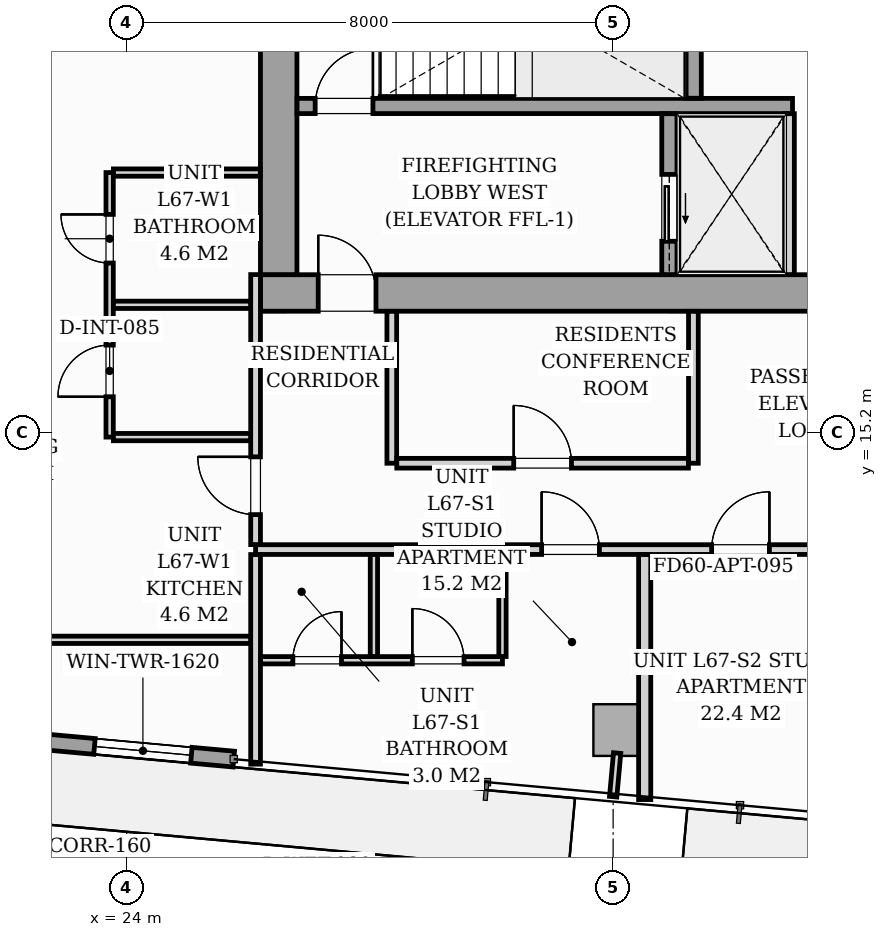
"""IFC4 building model, lengths in metres.
Left out: names, types, materials, properties, quantities, classifications, styles, units other than length and angle.
Written with IfcOpenShell. Run it as: python <this file> out.ifc"""

import sys

from ifc_helpers import new_model, si_unit, direction, frame, frame_2d, origin, origin_2d, place, context, subcontext, project, spatial, rectangle, i_section, extrude, source, transform, mapped, element, fill, save


model = new_model("IFC4")
c1 = context("Model", 3, precision=1e-05, world=origin(), true_north=direction((0.0, 1.0)))
c2 = subcontext(c1, "Body", "Model", "MODEL_VIEW")
j1 = project(units=[si_unit("LENGTHUNIT", "METRE"), si_unit("PLANEANGLEUNIT", "RADIAN")], contexts=[c1])
p1 = place(None, origin())
s1 = spatial("IfcSite", under=j1, at=p1, CompositionType="ELEMENT")
p2 = place(p1, origin())
s2 = spatial("IfcBuilding", under=s1, at=p2, CompositionType="ELEMENT")
p3 = place(p2, frame((0.0, 0.0, 233.1)))
s3 = spatial("IfcBuildingStorey", under=s2, at=p3, CompositionType="ELEMENT", Elevation=233.1)
m1 = source(origin(), c2, "Body", "SweptSolid", [
    extrude(i_section(OverallWidth=0.409, OverallDepth=0.425, WebThickness=0.033, FlangeThickness=0.052, FilletRadius=0.018, at=origin_2d()), origin(), (0.0, 0.0, 1.0), 3.296),
])
for number, where, z_axis, x_axis in (
    (1, (26.4, 17.4, 0.002), (0.0, 0.0, 1.0), (1.0, 0.0, 0.0)),
    (2, (33.12, 17.4, 0.002), (0.0, 0.0, 1.0), (1.0, 0.0, 0.0)),
):
    element("IfcColumn", number, at=place(p3, frame(where, z_axis=z_axis, x_axis=x_axis)), inside=s3, PredefinedType="PILASTER", context=c2, shape_type="MappedRepresentation", body=[
        mapped(m1, transform((0.0, 0.0, 0.0), scale=1.0)),
    ])
m2 = source(origin(), c2, "Body", "SweptSolid", [
    extrude(rectangle(XDim=0.85, YDim=0.85, at=origin_2d()), origin(), (0.0, 0.0, 1.0), 3.296),
])
p4 = place(p3, frame((32.1, 10.312, 0.002), z_axis=(0.0, 0.0, 1.0), x_axis=(0.995884398616, -0.090632580198, 0.0)))
e3 = element("IfcColumn", 3, at=p4, inside=s3, PredefinedType="COLUMN", context=c2, shape_type="MappedRepresentation", body=[
    mapped(m2, transform((0.0, 0.0, 0.0), scale=1.0)),
])
p5 = place(p3, frame((25.761, 9.834, 0.0), z_axis=(0.0, 0.0, 1.0), x_axis=(-0.995884584572, 0.090630536861, 0.0)))
e4 = element("IfcWall", 4, at=p5, inside=s3, PredefinedType="STANDARD", context=c2, shape_type="SweptSolid", body=[
    extrude(rectangle(XDim=14.63, YDim=0.26, at=frame_2d((7.315, 0.0))), origin(), (0.0, 0.0, 1.0), 3.04),
])
p6 = place(p5, frame((4.97, 0.0, 0.0)))
e5 = element("IfcOpeningElement", 5, at=p6, cuts=e4, PredefinedType="OPENING", context=c2, shape_type="SweptSolid", body=[
    extrude(rectangle(XDim=1.8, YDim=2.06, at=frame_2d((0.9, 1.03))), frame((0.0, 0.14, 0.0), z_axis=(0.0, -1.0, 0.0), x_axis=(1.0, 0.0, 0.0)), (0.0, 0.0, 1.0), 0.28),
])
p7 = place(p5, frame((0.7, 0.0, 0.65)))
e6 = element("IfcOpeningElement", 6, at=p7, cuts=e4, PredefinedType="OPENING", context=c2, shape_type="SweptSolid", body=[
    extrude(rectangle(XDim=1.6, YDim=1.5, at=frame_2d((0.8, 0.75))), frame((0.0, 0.14, 0.0), z_axis=(0.0, -1.0, 0.0), x_axis=(1.0, 0.0, 0.0)), (0.0, 0.0, 1.0), 0.28),
])
p8 = place(p3, frame((26.2, 17.5, 0.0), z_axis=(0.0, 0.0, 1.0), x_axis=(1.0, 0.0, 0.0)))
e7 = element("IfcWall", 7, at=p8, inside=s3, PredefinedType="SHEAR", context=c2, shape_type="SweptSolid", body=[
    extrude(rectangle(XDim=19.6, YDim=0.6, at=frame_2d((9.8, 0.0))), origin(), (0.0, 0.0, 1.0), 3.3),
])
p9 = place(p8, frame((0.95, 0.0, 0.0)))
e8 = element("IfcOpeningElement", 8, at=p9, cuts=e7, PredefinedType="OPENING", context=c2, shape_type="SweptSolid", body=[
    extrude(rectangle(XDim=0.95, YDim=2.06, at=frame_2d((0.475, 1.03))), frame((0.0, 0.31, 0.0), z_axis=(0.0, -1.0, 0.0), x_axis=(1.0, 0.0, 0.0)), (0.0, 0.0, 1.0), 0.62),
])
p10 = place(p8, frame((9.38, 0.0, 0.0)))
e9 = element("IfcOpeningElement", 9, at=p10, cuts=e7, PredefinedType="OPENING", context=c2, shape_type="SweptSolid", body=[
    extrude(rectangle(XDim=0.85, YDim=2.0, at=frame_2d((0.425, 1.0))), frame((0.0, 0.31, 0.0), z_axis=(0.0, -1.0, 0.0), x_axis=(1.0, 0.0, 0.0)), (0.0, 0.0, 1.0), 0.62),
])
p11 = place(p8, frame((17.55, 0.0, 0.0)))
e10 = element("IfcOpeningElement", 10, at=p11, cuts=e7, PredefinedType="OPENING", context=c2, shape_type="SweptSolid", body=[
    extrude(rectangle(XDim=0.95, YDim=2.06, at=frame_2d((0.475, 1.03))), frame((0.0, 0.31, 0.0), z_axis=(0.0, -1.0, 0.0), x_axis=(1.0, 0.0, 0.0)), (0.0, 0.0, 1.0), 0.62),
])
p12 = place(p3, frame((26.5, 17.802, 0.0), z_axis=(0.0, 0.0, 1.0), x_axis=(0.0, 1.0, 0.0)))
e11 = element("IfcWall", 11, at=p12, inside=s3, PredefinedType="SHEAR", context=c2, shape_type="SweptSolid", body=[
    extrude(rectangle(XDim=5.796, YDim=0.6, at=frame_2d((2.898, 0.0))), origin(), (0.0, 0.0, 1.0), 3.3),
])
p13 = place(p3, frame((26.802, 20.575, 0.0), z_axis=(0.0, 0.0, 1.0), x_axis=(1.0, 0.0, 0.0)))
e12 = element("IfcWall", 12, at=p13, inside=s3, PredefinedType="SOLIDWALL", context=c2, shape_type="SweptSolid", body=[
    extrude(rectangle(XDim=8.148, YDim=0.25, at=frame_2d((4.074, 0.0))), origin(), (0.0, 0.0, 1.0), 3.3),
])
p14 = place(p13, frame((0.298, 0.0, 0.0)))
e13 = element("IfcOpeningElement", 13, at=p14, cuts=e12, PredefinedType="OPENING", context=c2, shape_type="SweptSolid", body=[
    extrude(rectangle(XDim=0.95, YDim=2.06, at=frame_2d((0.475, 1.03))), frame((0.0, 0.135, 0.0), z_axis=(0.0, -1.0, 0.0), x_axis=(1.0, 0.0, 0.0)), (0.0, 0.0, 1.0), 0.27),
])
p15 = place(p3, frame((33.325, 20.702, 0.0), z_axis=(0.0, 0.0, 1.0), x_axis=(0.0, 1.0, 0.0)))
e14 = element("IfcWall", 14, at=p15, inside=s3, PredefinedType="SOLIDWALL", context=c2, shape_type="SweptSolid", body=[
    extrude(rectangle(XDim=2.896, YDim=0.25, at=frame_2d((1.448, 0.0))), origin(), (0.0, 0.0, 1.0), 3.3),
])
p16 = place(p3, frame((32.925, 17.802, 0.0), z_axis=(0.0, 0.0, 1.0), x_axis=(0.0, 1.0, 0.0)))
e15 = element("IfcWall", 15, at=p16, inside=s3, PredefinedType="SOLIDWALL", context=c2, shape_type="SweptSolid", body=[
    extrude(rectangle(XDim=2.646, YDim=0.25, at=frame_2d((1.323, 0.0))), origin(), (0.0, 0.0, 1.0), 3.3),
])
p17 = place(p16, frame((0.548, 0.0, 0.0)))
e16 = element("IfcOpeningElement", 16, at=p17, cuts=e15, PredefinedType="OPENING", context=c2, shape_type="SweptSolid", body=[
    extrude(rectangle(XDim=1.1, YDim=2.08, at=frame_2d((0.55, 1.04))), frame((0.0, 0.135, 0.0), z_axis=(0.0, -1.0, 0.0), x_axis=(1.0, 0.0, 0.0)), (0.0, 0.0, 1.0), 0.27),
])
p18 = place(p3, frame((34.9, 17.802, 0.0), z_axis=(0.0, 0.0, 1.0), x_axis=(0.0, 1.0, 0.0)))
e17 = element("IfcWall", 17, at=p18, inside=s3, PredefinedType="PARTITIONING", context=c2, shape_type="SweptSolid", body=[
    extrude(rectangle(XDim=2.646, YDim=0.16, at=frame_2d((1.323, 0.0))), origin(), (0.0, 0.0, 1.0), 3.04),
])
p19 = place(p3, frame((26.12, 13.28, 0.0), z_axis=(0.0, 0.0, 1.0), x_axis=(1.0, 0.0, 0.0)))
e18 = element("IfcWall", 18, at=p19, inside=s3, PredefinedType="PARTITIONING", context=c2, shape_type="SweptSolid", body=[
    extrude(rectangle(XDim=21.33, YDim=0.16, at=frame_2d((10.665, 0.0))), origin(), (0.0, 0.0, 1.0), 2.556),
])
p20 = place(p19, frame((4.704, 0.0, 0.0)))
e19 = element("IfcOpeningElement", 19, at=p20, cuts=e18, PredefinedType="OPENING", context=c2, shape_type="SweptSolid", body=[
    extrude(rectangle(XDim=0.95, YDim=2.06, at=frame_2d((0.475, 1.03))), frame((0.0, 0.09, 0.0), z_axis=(0.0, -1.0, 0.0), x_axis=(1.0, 0.0, 0.0)), (0.0, 0.0, 1.0), 0.18),
])
p21 = place(p19, frame((7.5, 0.0, 0.0)))
e20 = element("IfcOpeningElement", 20, at=p21, cuts=e18, PredefinedType="OPENING", context=c2, shape_type="SweptSolid", body=[
    extrude(rectangle(XDim=0.95, YDim=2.06, at=frame_2d((0.475, 1.03))), frame((0.0, 0.09, 0.0), z_axis=(0.0, -1.0, 0.0), x_axis=(1.0, 0.0, 0.0)), (0.0, 0.0, 1.0), 0.18),
])
p22 = place(p19, frame((14.976, 0.0, 0.0)))
e21 = element("IfcOpeningElement", 21, at=p22, cuts=e18, PredefinedType="OPENING", context=c2, shape_type="SweptSolid", body=[
    extrude(rectangle(XDim=0.95, YDim=2.06, at=frame_2d((0.475, 1.03))), frame((0.0, 0.09, 0.0), z_axis=(0.0, -1.0, 0.0), x_axis=(1.0, 0.0, 0.0)), (0.0, 0.0, 1.0), 0.18),
])
p23 = place(p3, frame((26.12, 9.751, 0.0), z_axis=(0.0, 0.0, 1.0), x_axis=(0.0, 1.0, 0.0)))
e22 = element("IfcWall", 22, at=p23, inside=s3, PredefinedType="PARTITIONING", context=c2, shape_type="SweptSolid", body=[
    extrude(rectangle(XDim=3.447, YDim=0.16, at=frame_2d((1.723, 0.0))), origin(), (0.0, 0.0, 1.0), 3.04),
])
p24 = place(p3, frame((26.12, 13.362, 0.0), z_axis=(0.0, 0.0, 1.0), x_axis=(0.0, 1.0, 0.0)))
e23 = element("IfcWall", 23, at=p24, inside=s3, PredefinedType="PARTITIONING", context=c2, shape_type="SweptSolid", body=[
    extrude(rectangle(XDim=4.44, YDim=0.16, at=frame_2d((2.22, 0.0))), origin(), (0.0, 0.0, 1.0), 3.04),
])
p25 = place(p24, frame((0.493, 0.0, 0.0)))
e24 = element("IfcOpeningElement", 24, at=p25, cuts=e23, PredefinedType="OPENING", context=c2, shape_type="SweptSolid", body=[
    extrude(rectangle(XDim=0.95, YDim=2.06, at=frame_2d((0.475, 1.03))), frame((0.0, 0.09, 0.0), z_axis=(0.0, -1.0, 0.0), x_axis=(1.0, 0.0, 0.0)), (0.0, 0.0, 1.0), 0.18),
])
p26 = place(p3, frame((26.202, 11.46, 0.0), z_axis=(0.0, 0.0, 1.0), x_axis=(1.0, 0.0, 0.0)))
e25 = element("IfcWall", 25, at=p26, inside=s3, PredefinedType="PARTITIONING", context=c2, shape_type="SweptSolid", body=[
    extrude(rectangle(XDim=3.978, YDim=0.12, at=frame_2d((1.989, 0.0))), origin(), (0.0, 0.0, 1.0), 2.556),
])
p27 = place(p26, frame((0.531, 0.0, 0.0)))
e26 = element("IfcOpeningElement", 26, at=p27, cuts=e25, PredefinedType="OPENING", context=c2, shape_type="SweptSolid", body=[
    extrude(rectangle(XDim=0.8, YDim=2.02, at=frame_2d((0.4, 1.01))), frame((0.0, 0.07, 0.0), z_axis=(0.0, -1.0, 0.0), x_axis=(1.0, 0.0, 0.0)), (0.0, 0.0, 1.0), 0.14),
])
p28 = place(p26, frame((2.496, 0.0, 0.0)))
e27 = element("IfcOpeningElement", 27, at=p28, cuts=e25, PredefinedType="OPENING", context=c2, shape_type="SweptSolid", body=[
    extrude(rectangle(XDim=0.85, YDim=2.05, at=frame_2d((0.425, 1.025))), frame((0.0, 0.07, 0.0), z_axis=(0.0, -1.0, 0.0), x_axis=(1.0, 0.0, 0.0)), (0.0, 0.0, 1.0), 0.14),
])
for number, where, z_axis, x_axis in (
    (28, (30.18, 11.522, 0.0), (0.0, 0.0, 1.0), (0.0, 1.0, 0.0)),
    (29, (28.066, 11.522, 0.0), (0.0, 0.0, 1.0), (0.0, 1.0, 0.0)),
):
    element("IfcWall", number, at=place(p3, frame(where, z_axis=z_axis, x_axis=x_axis)), inside=s3, PredefinedType="PARTITIONING", context=c2, shape_type="SweptSolid", body=[
        extrude(rectangle(XDim=1.676, YDim=0.12, at=frame_2d((0.838, 0.0))), origin(), (0.0, 0.0, 1.0), 3.04),
    ])
p29 = place(p3, frame((32.519, 9.169, 0.0), z_axis=(0.0, 0.0, 1.0), x_axis=(0.0, 1.0, 0.0)))
e30 = element("IfcWall", 30, at=p29, inside=s3, PredefinedType="PARTITIONING", context=c2, shape_type="SweptSolid", body=[
    extrude(rectangle(XDim=4.029, YDim=0.2, at=frame_2d((2.014, 0.0))), origin(), (0.0, 0.0, 1.0), 2.4),
])
p30 = place(p3, frame((23.72, 15.13, 0.0), z_axis=(0.0, 0.0, 1.0), x_axis=(0.0, 1.0, 0.0)))
e31 = element("IfcWall", 31, at=p30, inside=s3, PredefinedType="PARTITIONING", context=c2, shape_type="SweptSolid", body=[
    extrude(rectangle(XDim=4.35, YDim=0.12, at=frame_2d((2.175, 0.0))), origin(), (0.0, 0.0, 1.0), 3.04),
])
p31 = place(p30, frame((0.663, 0.0, 0.0)))
e32 = element("IfcOpeningElement", 32, at=p31, cuts=e31, PredefinedType="OPENING", context=c2, shape_type="SweptSolid", body=[
    extrude(rectangle(XDim=0.85, YDim=2.05, at=frame_2d((0.425, 1.025))), frame((0.0, 0.07, 0.0), z_axis=(0.0, -1.0, 0.0), x_axis=(1.0, 0.0, 0.0)), (0.0, 0.0, 1.0), 0.14),
])
p32 = place(p30, frame((2.862, 0.0, 0.0)))
e33 = element("IfcOpeningElement", 33, at=p32, cuts=e31, PredefinedType="OPENING", context=c2, shape_type="SweptSolid", body=[
    extrude(rectangle(XDim=0.8, YDim=2.02, at=frame_2d((0.4, 1.01))), frame((0.0, 0.07, 0.0), z_axis=(0.0, -1.0, 0.0), x_axis=(1.0, 0.0, 0.0)), (0.0, 0.0, 1.0), 0.14),
])
p33 = place(p3, frame((23.782, 17.305, 0.0), z_axis=(0.0, 0.0, 1.0), x_axis=(1.0, 0.0, 0.0)))
e34 = element("IfcWall", 34, at=p33, inside=s3, PredefinedType="PARTITIONING", context=c2, shape_type="SweptSolid", body=[
    extrude(rectangle(XDim=2.256, YDim=0.12, at=frame_2d((1.128, 0.0))), origin(), (0.0, 0.0, 1.0), 2.381),
])
p34 = place(p3, frame((23.782, 15.13, 0.0), z_axis=(0.0, 0.0, 1.0), x_axis=(1.0, 0.0, 0.0)))
e35 = element("IfcWall", 35, at=p34, inside=s3, PredefinedType="PARTITIONING", context=c2, shape_type="SweptSolid", body=[
    extrude(rectangle(XDim=2.256, YDim=0.12, at=frame_2d((1.128, 0.0))), origin(), (0.0, 0.0, 1.0), 3.04),
])
p35 = place(p3, frame((23.782, 19.48, 0.0), z_axis=(0.0, 0.0, 1.0), x_axis=(1.0, 0.0, 0.0)))
e36 = element("IfcWall", 36, at=p35, inside=s3, PredefinedType="PARTITIONING", context=c2, shape_type="SweptSolid", body=[
    extrude(rectangle(XDim=2.416, YDim=0.12, at=frame_2d((1.208, 0.0))), origin(), (0.0, 0.0, 1.0), 3.04),
])
p36 = place(p3, frame((11.512, 11.796, 0.0), z_axis=(0.0, 0.0, 1.0), x_axis=(1.0, 0.0, 0.0)))
e37 = element("IfcWall", 37, at=p36, inside=s3, PredefinedType="PARTITIONING", context=c2, shape_type="SweptSolid", body=[
    extrude(rectangle(XDim=14.526, YDim=0.12, at=frame_2d((7.263, 0.0))), origin(), (0.0, 0.0, 1.0), 2.482),
])
p37 = place(p36, frame((8.21, 0.0, 0.0)))
e38 = element("IfcOpeningElement", 38, at=p37, cuts=e37, PredefinedType="OPENING", context=c2, shape_type="SweptSolid", body=[
    extrude(rectangle(XDim=0.85, YDim=2.05, at=frame_2d((0.425, 1.025))), frame((0.0, 0.07, 0.0), z_axis=(0.0, -1.0, 0.0), x_axis=(1.0, 0.0, 0.0)), (0.0, 0.0, 1.0), 0.14),
])
for number, where, z_axis, x_axis in (
    (39, (28.36, 14.7, 0.0), (0.0, 0.0, 1.0), (0.0, 1.0, 0.0)),
    (40, (33.32, 14.7, 0.0), (0.0, 0.0, 1.0), (0.0, 1.0, 0.0)),
):
    element("IfcWall", number, at=place(p3, frame(where, z_axis=z_axis, x_axis=x_axis)), inside=s3, PredefinedType="PARTITIONING", context=c2, shape_type="SweptSolid", body=[
        extrude(rectangle(XDim=2.498, YDim=0.16, at=frame_2d((1.249, 0.0))), origin(), (0.0, 0.0, 1.0), 3.04),
    ])
p38 = place(p3, frame((28.442, 14.7, 0.0), z_axis=(0.0, 0.0, 1.0), x_axis=(1.0, 0.0, 0.0)))
e41 = element("IfcWall", 41, at=p38, inside=s3, PredefinedType="PARTITIONING", context=c2, shape_type="SweptSolid", body=[
    extrude(rectangle(XDim=4.796, YDim=0.16, at=frame_2d((2.398, 0.0))), origin(), (0.0, 0.0, 1.0), 2.556),
])
p39 = place(p38, frame((1.923, 0.0, 0.0)))
e42 = element("IfcOpeningElement", 42, at=p39, cuts=e41, PredefinedType="OPENING", context=c2, shape_type="SweptSolid", body=[
    extrude(rectangle(XDim=0.95, YDim=2.06, at=frame_2d((0.475, 1.03))), frame((0.0, 0.09, 0.0), z_axis=(0.0, -1.0, 0.0), x_axis=(1.0, 0.0, 0.0)), (0.0, 0.0, 1.0), 0.18),
])
p40 = place(p3, frame((32.066, 9.933, 0.0), z_axis=(0.0, 0.0, 1.0), x_axis=(-0.090872036342, -0.995862577373, 0.0)))
e43 = element("IfcWall", 43, at=p40, inside=s3, PredefinedType="PARTITIONING", context=c2, shape_type="SweptSolid", body=[
    extrude(rectangle(XDim=0.72, YDim=0.12, at=frame_2d((0.36, 0.0))), origin(), (0.0, 0.0, 1.0), 3.04),
])
m3 = source(origin(), c2, "Body", "SweptSolid", [
    extrude(rectangle(XDim=1.6, YDim=1.5, at=frame_2d((0.8, 0.75))), frame((0.0, 0.03, 0.0), z_axis=(0.0, -1.0, 0.0), x_axis=(1.0, 0.0, 0.0)), (0.0, 0.0, 1.0), 0.06),
])
p41 = place(p7, origin())
e44 = element("IfcWindow", 44, at=p41, inside=s3, PartitioningType="SINGLE_PANEL", PredefinedType="WINDOW", context=c2, shape_type="MappedRepresentation", body=[
    mapped(m3, transform((0.0, 0.0, 0.0), scale=1.0)),
])
fill(e6, e44)
m4 = source(origin(), c2, "Body", "SweptSolid", [
    extrude(rectangle(XDim=0.95, YDim=2.06, at=frame_2d((0.475, 1.03))), frame((0.0, 0.025, 0.0), z_axis=(0.0, -1.0, 0.0), x_axis=(1.0, 0.0, 0.0)), (0.0, 0.0, 1.0), 0.05),
])
p42 = place(p9, origin())
e45 = element("IfcDoor", 45, at=p42, inside=s3, OperationType="SINGLE_SWING_LEFT", PredefinedType="DOOR", context=c2, shape_type="MappedRepresentation", body=[
    mapped(m4, transform((0.0, 0.0, 0.0), scale=1.0)),
])
fill(e8, e45)
p43 = place(p14, origin())
e46 = element("IfcDoor", 46, at=p43, inside=s3, OperationType="SINGLE_SWING_RIGHT", PredefinedType="DOOR", context=c2, shape_type="MappedRepresentation", body=[
    mapped(m4, transform((0.0, 0.0, 0.0), scale=1.0)),
])
fill(e13, e46)
m5 = source(origin(), c2, "Body", "SweptSolid", [
    extrude(rectangle(XDim=1.1, YDim=2.08, at=frame_2d((0.55, 1.04))), frame((0.0, 0.025, 0.0), z_axis=(0.0, -1.0, 0.0), x_axis=(1.0, 0.0, 0.0)), (0.0, 0.0, 1.0), 0.05),
])
p44 = place(p17, origin())
e47 = element("IfcDoor", 47, at=p44, inside=s3, OperationType="SLIDING_TO_LEFT", PredefinedType="DOOR", context=c2, shape_type="MappedRepresentation", body=[
    mapped(m5, transform((0.0, 0.0, 0.0), scale=1.0)),
])
fill(e16, e47)
m6 = source(origin(), c2, "Body", "SweptSolid", [
    extrude(rectangle(XDim=0.95, YDim=2.06, at=frame_2d((0.475, 1.03))), frame((0.0, 0.025, 0.0), z_axis=(0.0, -1.0, 0.0), x_axis=(1.0, 0.0, 0.0)), (0.0, 0.0, 1.0), 0.05),
])
p45 = place(p20, origin())
e48 = element("IfcDoor", 48, at=p45, inside=s3, OperationType="SINGLE_SWING_LEFT", PredefinedType="DOOR", context=c2, shape_type="MappedRepresentation", body=[
    mapped(m6, transform((0.0, 0.0, 0.0), scale=1.0)),
])
fill(e19, e48)
m7 = source(origin(), c2, "Body", "SweptSolid", [
    extrude(rectangle(XDim=0.8, YDim=2.02, at=frame_2d((0.4, 1.01))), frame((0.0, 0.025, 0.0), z_axis=(0.0, -1.0, 0.0), x_axis=(1.0, 0.0, 0.0)), (0.0, 0.0, 1.0), 0.05),
])
p46 = place(p27, origin())
e49 = element("IfcDoor", 49, at=p46, inside=s3, OperationType="SINGLE_SWING_RIGHT", PredefinedType="DOOR", context=c2, shape_type="MappedRepresentation", body=[
    mapped(m7, transform((0.0, 0.0, 0.0), scale=1.0)),
])
fill(e26, e49)
m8 = source(origin(), c2, "Body", "SweptSolid", [
    extrude(rectangle(XDim=0.85, YDim=2.05, at=frame_2d((0.425, 1.025))), frame((0.0, 0.025, 0.0), z_axis=(0.0, -1.0, 0.0), x_axis=(1.0, 0.0, 0.0)), (0.0, 0.0, 1.0), 0.05),
])
p47 = place(p28, origin())
e50 = element("IfcDoor", 50, at=p47, inside=s3, OperationType="SINGLE_SWING_LEFT", PredefinedType="DOOR", context=c2, shape_type="MappedRepresentation", body=[
    mapped(m8, transform((0.0, 0.0, 0.0), scale=1.0)),
])
fill(e27, e50)
p48 = place(p21, origin())
e51 = element("IfcDoor", 51, at=p48, inside=s3, OperationType="SINGLE_SWING_RIGHT", PredefinedType="DOOR", context=c2, shape_type="MappedRepresentation", body=[
    mapped(m6, transform((0.0, 0.0, 0.0), scale=1.0)),
])
fill(e20, e51)
p49 = place(p25, origin())
e52 = element("IfcDoor", 52, at=p49, inside=s3, OperationType="SINGLE_SWING_RIGHT", PredefinedType="DOOR", context=c2, shape_type="MappedRepresentation", body=[
    mapped(m6, transform((0.0, 0.0, 0.0), scale=1.0)),
])
fill(e24, e52)
p50 = place(p31, origin())
e53 = element("IfcDoor", 53, at=p50, inside=s3, OperationType="SINGLE_SWING_LEFT", PredefinedType="DOOR", context=c2, shape_type="MappedRepresentation", body=[
    mapped(m8, transform((0.0, 0.0, 0.0), scale=1.0)),
])
fill(e32, e53)
p51 = place(p32, origin())
e54 = element("IfcDoor", 54, at=p51, inside=s3, OperationType="SINGLE_SWING_RIGHT", PredefinedType="DOOR", context=c2, shape_type="MappedRepresentation", body=[
    mapped(m7, transform((0.0, 0.0, 0.0), scale=1.0)),
])
fill(e33, e54)
p52 = place(p39, origin())
e55 = element("IfcDoor", 55, at=p52, inside=s3, OperationType="SINGLE_SWING_LEFT", PredefinedType="DOOR", context=c2, shape_type="MappedRepresentation", body=[
    mapped(m6, transform((0.0, 0.0, 0.0), scale=1.0)),
])
fill(e42, e55)
save(model, sys.argv[1])
